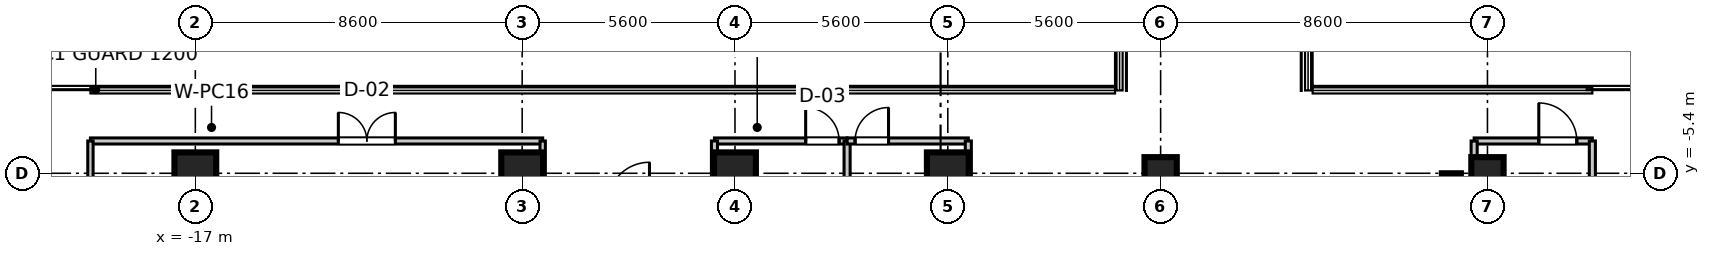
"""IFC4 building model, lengths in metres.
Left out: names, types, materials, properties, quantities, classifications, styles, units other than length and angle.
Written with IfcOpenShell. Run it as: python <this file> out.ifc"""

import sys

from ifc_helpers import new_model, si_unit, direction, frame, frame_2d, origin, origin_2d, place, context, subcontext, project, spatial, rectangle, extrude, source, transform, mapped, element, fill, save


model = new_model("IFC4")
c1 = context("Model", 3, precision=1e-05, world=origin(), true_north=direction((0.0, 1.0)))
c2 = subcontext(c1, "Body", "Model", "MODEL_VIEW")
j1 = project(units=[si_unit("LENGTHUNIT", "METRE"), si_unit("PLANEANGLEUNIT", "RADIAN")], contexts=[c1])
p1 = place(None, origin())
s1 = spatial("IfcSite", under=j1, at=p1, CompositionType="ELEMENT")
p2 = place(p1, origin())
s2 = spatial("IfcBuilding", under=s1, at=p2, CompositionType="ELEMENT")
p3 = place(p2, frame((0.0, 0.0, 170.9)))
s3 = spatial("IfcBuildingStorey", under=s2, at=p3, CompositionType="ELEMENT", Elevation=170.9)
m1 = source(origin(), c2, "Body", "SweptSolid", [
    extrude(rectangle(XDim=1.1, YDim=1.1, at=origin_2d()), origin(), (0.0, 0.0, 1.0), 3.605),
])
for number, where, z_axis, x_axis in (
    (1, (-17.0, -5.4, 0.0), (0.0, 0.0, 1.0), (1.0, 0.0, 0.0)),
    (2, (-8.4, -5.4, 0.0), (0.0, 0.0, 1.0), (1.0, 0.0, 0.0)),
    (3, (-2.8, -5.4, 0.0), (0.0, 0.0, 1.0), (1.0, 0.0, 0.0)),
    (4, (2.8, -5.4, 0.0), (0.0, 0.0, 1.0), (1.0, 0.0, 0.0)),
):
    element("IfcColumn", number, at=place(p3, frame(where, z_axis=z_axis, x_axis=x_axis)), inside=s3, PredefinedType="COLUMN", context=c2, shape_type="MappedRepresentation", body=[
        mapped(m1, transform((0.0, 0.0, 0.0), scale=1.0)),
    ])
m2 = source(origin(), c2, "Body", "SweptSolid", [
    extrude(rectangle(XDim=0.85, YDim=0.85, at=origin_2d()), origin(), (0.0, 0.0, 1.0), 3.605),
])
for number, where, z_axis, x_axis in (
    (5, (8.4, -5.4, 0.0), (0.0, 0.0, 1.0), (1.0, 0.0, 0.0)),
    (6, (17.0, -5.4, 0.0), (0.0, 0.0, 1.0), (1.0, 0.0, 0.0)),
):
    element("IfcColumn", number, at=place(p3, frame(where, z_axis=z_axis, x_axis=x_axis)), inside=s3, PredefinedType="PILASTER", context=c2, shape_type="MappedRepresentation", body=[
        mapped(m2, transform((0.0, 0.0, 0.0), scale=1.0)),
    ])
m3 = source(origin(), c2, "Body", "SweptSolid", [
    extrude(rectangle(XDim=11.6, YDim=0.5, at=frame_2d((5.8, 0.0))), origin(), (0.0, 0.0, 1.0), 3.39),
])
p4 = place(p3, frame((16.05, -17.0, 0.0), z_axis=(0.0, 0.0, 1.0), x_axis=(0.0, 1.0, 0.0)))
e7 = element("IfcWall", 7, at=p4, inside=s3, PredefinedType="SHEAR", context=c2, shape_type="MappedRepresentation", body=[
    mapped(m3, transform((0.0, 0.0, 0.0), scale=1.0)),
])
m4 = source(origin(), c2, "Body", "SweptSolid", [
    extrude(rectangle(XDim=3.11, YDim=0.16, at=frame_2d((1.555, 0.0))), origin(), (0.0, 0.0, 1.0), 2.73),
])
p5 = place(p3, frame((16.65, -4.55, 0.0), z_axis=(0.0, 0.0, 1.0), x_axis=(1.0, 0.0, 0.0)))
e8 = element("IfcWall", 8, at=p5, inside=s3, PredefinedType="PARTITIONING", context=c2, shape_type="MappedRepresentation", body=[
    mapped(m4, transform((0.0, 0.0, 0.0), scale=1.0)),
])
p6 = place(p5, frame((1.701, 0.0, 0.0)))
e9 = element("IfcOpeningElement", 9, at=p6, cuts=e8, PredefinedType="OPENING", context=c2, shape_type="SweptSolid", body=[
    extrude(rectangle(XDim=1.0, YDim=2.1, at=frame_2d((0.5, 1.05))), frame((0.0, 0.09, 0.0), z_axis=(0.0, -1.0, 0.0), x_axis=(1.0, 0.0, 0.0)), (0.0, 0.0, 1.0), 0.18),
])
m5 = source(origin(), c2, "Body", "SweptSolid", [
    extrude(rectangle(XDim=17.95, YDim=0.16, at=frame_2d((8.975, 0.0))), origin(), (0.0, 0.0, 1.0), 2.73),
])
p7 = place(p3, frame((16.65, -22.5, 0.0), z_axis=(0.0, 0.0, 1.0), x_axis=(0.0, 1.0, 0.0)))
e10 = element("IfcWall", 10, at=p7, inside=s3, PredefinedType="PARTITIONING", context=c2, shape_type="MappedRepresentation", body=[
    mapped(m5, transform((0.0, 0.0, 0.0), scale=1.0)),
])
m6 = source(origin(), c2, "Body", "SweptSolid", [
    extrude(rectangle(XDim=16.53, YDim=0.16, at=frame_2d((8.265, 0.0))), origin(), (0.0, 0.0, 1.0), 2.73),
])
p8 = place(p3, frame((19.76, -21.08, 0.0), z_axis=(0.0, 0.0, 1.0), x_axis=(0.0, 1.0, 0.0)))
e11 = element("IfcWall", 11, at=p8, inside=s3, PredefinedType="PARTITIONING", context=c2, shape_type="MappedRepresentation", body=[
    mapped(m6, transform((0.0, 0.0, 0.0), scale=1.0)),
])
m7 = source(origin(), c2, "Body", "SweptSolid", [
    extrude(rectangle(XDim=11.9, YDim=0.16, at=frame_2d((5.95, 0.0))), origin(), (0.0, 0.0, 1.0), 2.73),
])
p9 = place(p3, frame((-19.76, -4.55, 0.0), z_axis=(0.0, 0.0, 1.0), x_axis=(1.0, 0.0, 0.0)))
e12 = element("IfcWall", 12, at=p9, inside=s3, PredefinedType="PARTITIONING", context=c2, shape_type="MappedRepresentation", body=[
    mapped(m7, transform((0.0, 0.0, 0.0), scale=1.0)),
])
p10 = place(p9, frame((6.523, 0.0, 0.0)))
e13 = element("IfcOpeningElement", 13, at=p10, cuts=e12, PredefinedType="OPENING", context=c2, shape_type="SweptSolid", body=[
    extrude(rectangle(XDim=1.5, YDim=2.15, at=frame_2d((0.75, 1.075))), frame((0.0, 0.09, 0.0), z_axis=(0.0, -1.0, 0.0), x_axis=(1.0, 0.0, 0.0)), (0.0, 0.0, 1.0), 0.18),
])
m8 = source(origin(), c2, "Body", "SweptSolid", [
    extrude(rectangle(XDim=16.53, YDim=0.14, at=frame_2d((8.265, 0.0))), origin(), (0.0, 0.0, 1.0), 2.73),
])
p11 = place(p3, frame((-19.76, -21.08, 0.0), z_axis=(0.0, 0.0, 1.0), x_axis=(0.0, 1.0, 0.0)))
e14 = element("IfcWall", 14, at=p11, inside=s3, PredefinedType="PARTITIONING", context=c2, shape_type="MappedRepresentation", body=[
    mapped(m8, transform((0.0, 0.0, 0.0), scale=1.0)),
])
m9 = source(origin(), c2, "Body", "SweptSolid", [
    extrude(rectangle(XDim=17.95, YDim=0.14, at=frame_2d((8.975, 0.0))), origin(), (0.0, 0.0, 1.0), 2.73),
])
p12 = place(p3, frame((-7.86, -22.5, 0.0), z_axis=(0.0, 0.0, 1.0), x_axis=(0.0, 1.0, 0.0)))
e15 = element("IfcWall", 15, at=p12, inside=s3, PredefinedType="PARTITIONING", context=c2, shape_type="MappedRepresentation", body=[
    mapped(m9, transform((0.0, 0.0, 0.0), scale=1.0)),
])
m10 = source(origin(), c2, "Body", "SweptSolid", [
    extrude(rectangle(XDim=3.49, YDim=0.16, at=frame_2d((1.745, 0.0))), origin(), (0.0, 0.0, 1.0), 2.73),
])
p13 = place(p3, frame((-3.34, -4.55, 0.0), z_axis=(0.0, 0.0, 1.0), x_axis=(1.0, 0.0, 0.0)))
e16 = element("IfcWall", 16, at=p13, inside=s3, PredefinedType="PARTITIONING", context=c2, shape_type="MappedRepresentation", body=[
    mapped(m10, transform((0.0, 0.0, 0.0), scale=1.0)),
])
p14 = place(p13, frame((2.4, 0.0, 0.0)))
e17 = element("IfcOpeningElement", 17, at=p14, cuts=e16, PredefinedType="OPENING", context=c2, shape_type="SweptSolid", body=[
    extrude(rectangle(XDim=0.88, YDim=2.1, at=frame_2d((0.44, 1.05))), frame((0.0, 0.09, 0.0), z_axis=(0.0, -1.0, 0.0), x_axis=(1.0, 0.0, 0.0)), (0.0, 0.0, 1.0), 0.18),
])
for number, where, z_axis, x_axis in (
    (18, (-3.34, -22.5, 0.0), (0.0, 0.0, 1.0), (0.0, 1.0, 0.0)),
    (19, (0.15, -22.5, 0.0), (0.0, 0.0, 1.0), (0.0, 1.0, 0.0)),
):
    element("IfcWall", number, at=place(p3, frame(where, z_axis=z_axis, x_axis=x_axis)), inside=s3, PredefinedType="PARTITIONING", context=c2, shape_type="MappedRepresentation", body=[
        mapped(m5, transform((0.0, 0.0, 0.0), scale=1.0)),
    ])
m11 = source(origin(), c2, "Body", "SweptSolid", [
    extrude(rectangle(XDim=3.19, YDim=0.16, at=frame_2d((1.595, 0.0))), origin(), (0.0, 0.0, 1.0), 2.73),
])
p15 = place(p3, frame((0.15, -4.55, 0.0), z_axis=(0.0, 0.0, 1.0), x_axis=(1.0, 0.0, 0.0)))
e20 = element("IfcWall", 20, at=p15, inside=s3, PredefinedType="PARTITIONING", context=c2, shape_type="MappedRepresentation", body=[
    mapped(m11, transform((0.0, 0.0, 0.0), scale=1.0)),
])
p16 = place(p15, frame((0.21, 0.0, 0.0)))
e21 = element("IfcOpeningElement", 21, at=p16, cuts=e20, PredefinedType="OPENING", context=c2, shape_type="SweptSolid", body=[
    extrude(rectangle(XDim=0.88, YDim=2.1, at=frame_2d((0.44, 1.05))), frame((0.0, 0.09, 0.0), z_axis=(0.0, -1.0, 0.0), x_axis=(1.0, 0.0, 0.0)), (0.0, 0.0, 1.0), 0.18),
])
p17 = place(p3, frame((3.34, -22.5, 0.0), z_axis=(0.0, 0.0, 1.0), x_axis=(0.0, 1.0, 0.0)))
e22 = element("IfcWall", 22, at=p17, inside=s3, PredefinedType="PARTITIONING", context=c2, shape_type="MappedRepresentation", body=[
    mapped(m5, transform((0.0, 0.0, 0.0), scale=1.0)),
])
m12 = source(origin(), c2, "Body", "SweptSolid", [
    extrude(rectangle(XDim=1.0, YDim=2.1, at=frame_2d((0.5, 1.05))), frame((0.0, 0.025, 0.0), z_axis=(0.0, -1.0, 0.0), x_axis=(1.0, 0.0, 0.0)), (0.0, 0.0, 1.0), 0.05),
])
p18 = place(p6, frame((1.0, 0.0, 0.0), z_axis=(0.0, 0.0, 1.0), x_axis=(-1.0, 0.0, 0.0)))
e23 = element("IfcDoor", 23, at=p18, inside=s3, OperationType="SINGLE_SWING_LEFT", PredefinedType="DOOR", context=c2, shape_type="MappedRepresentation", body=[
    mapped(m12, transform((0.0, 0.0, 0.0), scale=1.0)),
])
fill(e9, e23)
m13 = source(origin(), c2, "Body", "SweptSolid", [
    extrude(rectangle(XDim=1.5, YDim=2.15, at=frame_2d((0.75, 1.075))), frame((0.0, 0.025, 0.0), z_axis=(0.0, -1.0, 0.0), x_axis=(1.0, 0.0, 0.0)), (0.0, 0.0, 1.0), 0.05),
])
p19 = place(p10, frame((1.5, 0.0, 0.0), z_axis=(0.0, 0.0, 1.0), x_axis=(-1.0, 0.0, 0.0)))
e24 = element("IfcDoor", 24, at=p19, inside=s3, OperationType="DOUBLE_DOOR_SINGLE_SWING", PredefinedType="DOOR", context=c2, shape_type="MappedRepresentation", body=[
    mapped(m13, transform((0.0, 0.0, 0.0), scale=1.0)),
])
fill(e13, e24)
m14 = source(origin(), c2, "Body", "SweptSolid", [
    extrude(rectangle(XDim=0.88, YDim=2.1, at=frame_2d((0.44, 1.05))), frame((0.0, 0.025, 0.0), z_axis=(0.0, -1.0, 0.0), x_axis=(1.0, 0.0, 0.0)), (0.0, 0.0, 1.0), 0.05),
])
p20 = place(p14, frame((0.88, 0.0, 0.0), z_axis=(0.0, 0.0, 1.0), x_axis=(-1.0, 0.0, 0.0)))
e25 = element("IfcDoor", 25, at=p20, inside=s3, OperationType="SINGLE_SWING_LEFT", PredefinedType="DOOR", context=c2, shape_type="MappedRepresentation", body=[
    mapped(m14, transform((0.0, 0.0, 0.0), scale=1.0)),
])
fill(e17, e25)
p21 = place(p16, frame((0.88, 0.0, 0.0), z_axis=(0.0, 0.0, 1.0), x_axis=(-1.0, 0.0, 0.0)))
e26 = element("IfcDoor", 26, at=p21, inside=s3, OperationType="SINGLE_SWING_RIGHT", PredefinedType="DOOR", context=c2, shape_type="MappedRepresentation", body=[
    mapped(m14, transform((0.0, 0.0, 0.0), scale=1.0)),
])
fill(e21, e26)
save(model, sys.argv[1])
